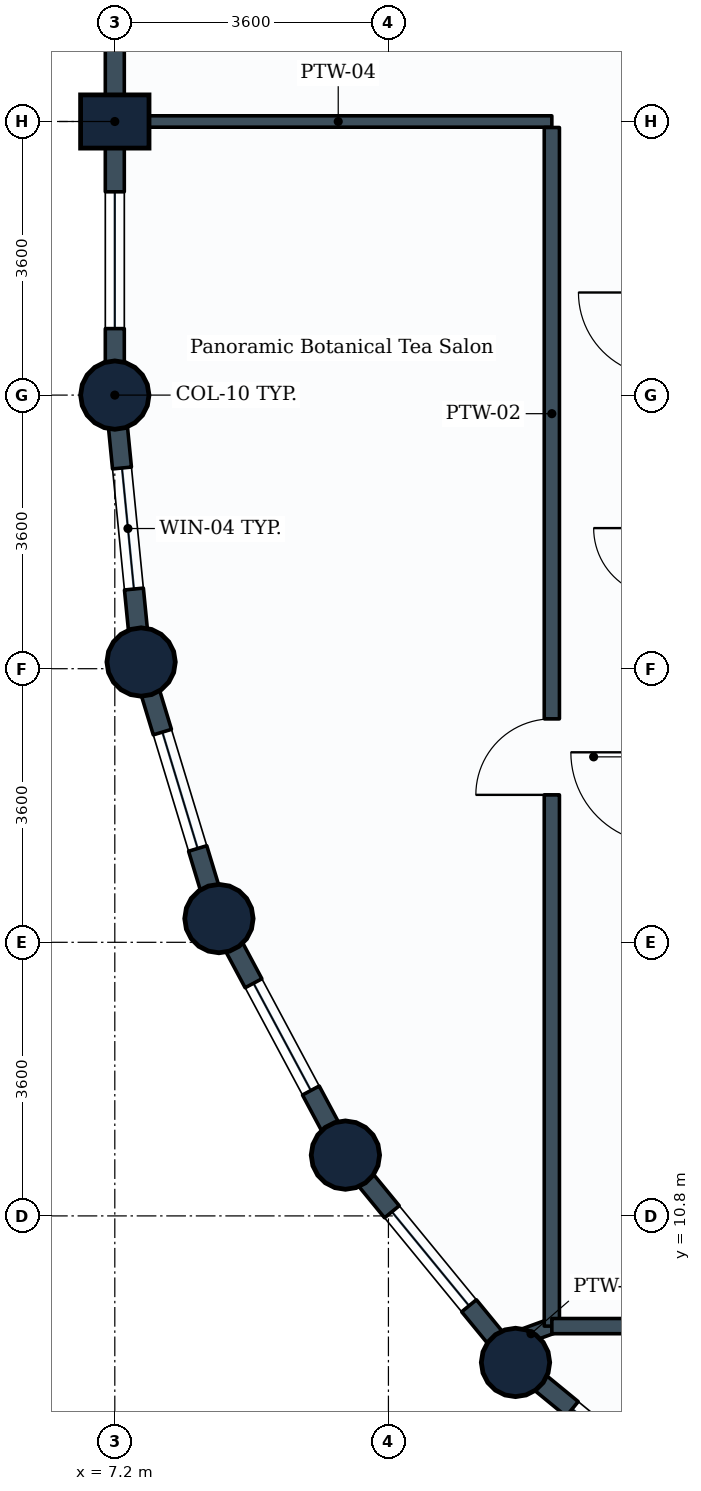
"""IFC4 building model, lengths in metres.
Left out: names, types, materials, properties, quantities, classifications, styles, units other than length and angle.
Written with IfcOpenShell. Run it as: python <this file> out.ifc"""

import sys

from ifc_helpers import new_model, si_unit, direction, frame, frame_2d, origin, origin_2d, place, context, subcontext, project, spatial, rectangle, circle, extrude, element, fill, save


model = new_model("IFC4")
c1 = context("Model", 3, precision=1e-05, world=origin(), true_north=direction((0.0, 1.0)))
c2 = subcontext(c1, "Body", "Model", "MODEL_VIEW")
j1 = project(units=[si_unit("LENGTHUNIT", "METRE"), si_unit("PLANEANGLEUNIT", "RADIAN")], contexts=[c1])
p1 = place(None, origin())
s1 = spatial("IfcSite", under=j1, at=p1, CompositionType="ELEMENT")
p2 = place(p1, origin())
s2 = spatial("IfcBuilding", under=s1, at=p2, CompositionType="ELEMENT")
p3 = place(p2, frame((0.0, 0.0, 174.8)))
s3 = spatial("IfcBuildingStorey", under=s2, at=p3, CompositionType="ELEMENT", Elevation=174.8)
p4 = place(p3, frame((7.2, 21.6, 0.0), z_axis=(0.0, 0.0, 1.0), x_axis=(1.0, 0.0, 0.0)))
e1 = element("IfcColumn", 1, at=p4, inside=s3, PredefinedType="COLUMN", context=c2, shape_type="SweptSolid", body=[
    extrude(circle(Radius=0.45, at=origin_2d()), origin(), (0.0, 0.0, 1.0), 3.8),
])
p5 = place(p3, frame((7.2, 25.2, 0.0), z_axis=(0.0, 0.0, 1.0), x_axis=(0.0, 1.0, 0.0)))
e2 = element("IfcColumn", 2, at=p5, inside=s3, PredefinedType="COLUMN", context=c2, shape_type="SweptSolid", body=[
    extrude(rectangle(XDim=0.7, YDim=0.9, at=origin_2d()), origin(), (0.0, 0.0, 1.0), 3.8),
])
for number, where, z_axis, x_axis in (
    (3, (7.546, 18.088, 0.0), (0.0, 0.0, 1.0), (1.0, 0.0, 0.0)),
    (4, (8.57, 14.712, 0.0), (0.0, 0.0, 1.0), (1.0, 0.0, 0.0)),
    (5, (10.234, 11.6, 0.0), (0.0, 0.0, 1.0), (1.0, 0.0, 0.0)),
    (6, (12.472, 8.872, 0.0), (0.0, 0.0, 1.0), (1.0, 0.0, 0.0)),
):
    element("IfcColumn", number, at=place(p3, frame(where, z_axis=z_axis, x_axis=x_axis)), inside=s3, PredefinedType="COLUMN", context=c2, shape_type="SweptSolid", body=[
        extrude(circle(Radius=0.45, at=origin_2d()), origin(), (0.0, 0.0, 1.0), 3.8),
    ])
p6 = place(p3, frame((7.2, 25.2, 0.0), z_axis=(0.0, 0.0, 1.0), x_axis=(0.0, 1.0, 0.0)))
e7 = element("IfcWall", 7, at=p6, inside=s3, PredefinedType="STANDARD", context=c2, shape_type="SweptSolid", body=[
    extrude(rectangle(XDim=3.6, YDim=0.25, at=frame_2d((1.8, 0.0))), origin(), (0.0, 0.0, 1.0), 2.93),
])
p7 = place(p3, frame((7.2, 21.6, 0.0), z_axis=(0.0, 0.0, 1.0), x_axis=(0.0, 1.0, 0.0)))
e8 = element("IfcWall", 8, at=p7, inside=s3, PredefinedType="STANDARD", context=c2, shape_type="SweptSolid", body=[
    extrude(rectangle(XDim=3.6, YDim=0.25, at=frame_2d((1.8, 0.0))), origin(), (0.0, 0.0, 1.0), 2.93),
])
p8 = place(p7, frame((0.875, 0.0, 0.85)))
e9 = element("IfcOpeningElement", 9, at=p8, cuts=e8, PredefinedType="OPENING", context=c2, shape_type="SweptSolid", body=[
    extrude(rectangle(XDim=1.8, YDim=1.35, at=frame_2d((0.9, 0.675))), frame((0.0, 0.135, 0.0), z_axis=(0.0, -1.0, 0.0), x_axis=(1.0, 0.0, 0.0)), (0.0, 0.0, 1.0), 0.27),
])
p9 = place(p3, frame((7.546, 18.088, 0.0), z_axis=(0.0, 0.0, 1.0), x_axis=(-0.09802417461, 0.995184033831, 0.0)))
e10 = element("IfcWall", 10, at=p9, inside=s3, PredefinedType="STANDARD", context=c2, shape_type="SweptSolid", body=[
    extrude(rectangle(XDim=3.529, YDim=0.25, at=frame_2d((1.765, 0.0))), origin(), (0.0, 0.0, 1.0), 2.93),
])
p10 = place(p9, frame((0.965, 0.0, 0.85)))
e11 = element("IfcOpeningElement", 11, at=p10, cuts=e10, PredefinedType="OPENING", context=c2, shape_type="SweptSolid", body=[
    extrude(rectangle(XDim=1.6, YDim=1.35, at=frame_2d((0.8, 0.675))), frame((0.0, 0.135, 0.0), z_axis=(0.0, -1.0, 0.0), x_axis=(1.0, 0.0, 0.0)), (0.0, 0.0, 1.0), 0.27),
])
p11 = place(p3, frame((8.57, 14.712, 0.0), z_axis=(0.0, 0.0, 1.0), x_axis=(-0.290305086481, 0.956934144423, 0.0)))
e12 = element("IfcWall", 12, at=p11, inside=s3, PredefinedType="STANDARD", context=c2, shape_type="SweptSolid", body=[
    extrude(rectangle(XDim=3.528, YDim=0.25, at=frame_2d((1.764, 0.0))), origin(), (0.0, 0.0, 1.0), 2.93),
])
p12 = place(p11, frame((0.964, 0.0, 0.85)))
e13 = element("IfcOpeningElement", 13, at=p12, cuts=e12, PredefinedType="OPENING", context=c2, shape_type="SweptSolid", body=[
    extrude(rectangle(XDim=1.6, YDim=1.35, at=frame_2d((0.8, 0.675))), frame((0.0, 0.135, 0.0), z_axis=(0.0, -1.0, 0.0), x_axis=(1.0, 0.0, 0.0)), (0.0, 0.0, 1.0), 0.27),
])
p13 = place(p3, frame((10.234, 11.6, 0.0), z_axis=(0.0, 0.0, 1.0), x_axis=(-0.47151087309, 0.881860247748, 0.0)))
e14 = element("IfcWall", 14, at=p13, inside=s3, PredefinedType="STANDARD", context=c2, shape_type="SweptSolid", body=[
    extrude(rectangle(XDim=3.529, YDim=0.25, at=frame_2d((1.764, 0.0))), origin(), (0.0, 0.0, 1.0), 2.93),
])
p14 = place(p13, frame((0.964, 0.0, 0.85)))
e15 = element("IfcOpeningElement", 15, at=p14, cuts=e14, PredefinedType="OPENING", context=c2, shape_type="SweptSolid", body=[
    extrude(rectangle(XDim=1.6, YDim=1.35, at=frame_2d((0.8, 0.675))), frame((0.0, 0.135, 0.0), z_axis=(0.0, -1.0, 0.0), x_axis=(1.0, 0.0, 0.0)), (0.0, 0.0, 1.0), 0.27),
])
p15 = place(p3, frame((12.472, 8.872, 0.0), z_axis=(0.0, 0.0, 1.0), x_axis=(-0.634258295121, 0.773121216285, 0.0)))
e16 = element("IfcWall", 16, at=p15, inside=s3, PredefinedType="STANDARD", context=c2, shape_type="SweptSolid", body=[
    extrude(rectangle(XDim=3.529, YDim=0.25, at=frame_2d((1.764, 0.0))), origin(), (0.0, 0.0, 1.0), 2.93),
])
p16 = place(p15, frame((0.964, 0.0, 0.85)))
e17 = element("IfcOpeningElement", 17, at=p16, cuts=e16, PredefinedType="OPENING", context=c2, shape_type="SweptSolid", body=[
    extrude(rectangle(XDim=1.6, YDim=1.35, at=frame_2d((0.8, 0.675))), frame((0.0, 0.135, 0.0), z_axis=(0.0, -1.0, 0.0), x_axis=(1.0, 0.0, 0.0)), (0.0, 0.0, 1.0), 0.27),
])
p17 = place(p3, frame((15.2, 6.634, 0.0), z_axis=(0.0, 0.0, 1.0), x_axis=(-0.773121216285, 0.634258295121, 0.0)))
e18 = element("IfcWall", 18, at=p17, inside=s3, PredefinedType="STANDARD", context=c2, shape_type="SweptSolid", body=[
    extrude(rectangle(XDim=3.529, YDim=0.25, at=frame_2d((1.764, 0.0))), origin(), (0.0, 0.0, 1.0), 2.93),
])
p18 = place(p17, frame((0.964, 0.0, 0.85)))
e19 = element("IfcOpeningElement", 19, at=p18, cuts=e18, PredefinedType="OPENING", context=c2, shape_type="SweptSolid", body=[
    extrude(rectangle(XDim=1.6, YDim=1.35, at=frame_2d((0.8, 0.675))), frame((0.0, 0.135, 0.0), z_axis=(0.0, -1.0, 0.0), x_axis=(1.0, 0.0, 0.0)), (0.0, 0.0, 1.0), 0.27),
])
p19 = place(p3, frame((7.329, 25.2, 0.0), z_axis=(0.0, 0.0, 1.0), x_axis=(1.0, 0.0, 0.0)))
e20 = element("IfcWall", 20, at=p19, inside=s3, PredefinedType="PARTITIONING", context=c2, shape_type="SweptSolid", body=[
    extrude(rectangle(XDim=5.621, YDim=0.15, at=frame_2d((2.811, 0.0))), origin(), (0.0, 0.0, 1.0), 3.535),
])
p20 = place(p3, frame((12.95, 9.35, 0.0), z_axis=(0.0, 0.0, 1.0), x_axis=(-0.939585793139, -0.342313507376, 0.0)))
e21 = element("IfcWall", 21, at=p20, inside=s3, PredefinedType="PARTITIONING", context=c2, shape_type="SweptSolid", body=[
    extrude(rectangle(XDim=0.584, YDim=0.2, at=frame_2d((0.292, 0.0))), origin(), (0.0, 0.0, 1.0), 2.93),
])
p21 = place(p3, frame((12.95, 9.35, 0.0), z_axis=(0.0, 0.0, 1.0), x_axis=(0.0, 1.0, 0.0)))
e22 = element("IfcWall", 22, at=p21, inside=s3, PredefinedType="PARTITIONING", context=c2, shape_type="SweptSolid", body=[
    extrude(rectangle(XDim=15.771, YDim=0.2, at=frame_2d((7.885, 0.0))), origin(), (0.0, 0.0, 1.0), 3.17),
])
p22 = place(p21, frame((6.99, 0.0, 0.0)))
e23 = element("IfcOpeningElement", 23, at=p22, cuts=e22, PredefinedType="OPENING", context=c2, shape_type="SweptSolid", body=[
    extrude(rectangle(XDim=1.0, YDim=2.1, at=frame_2d((0.5, 1.05))), frame((0.0, 0.11, 0.0), z_axis=(0.0, -1.0, 0.0), x_axis=(1.0, 0.0, 0.0)), (0.0, 0.0, 1.0), 0.22),
])
p23 = place(p3, frame((12.95, 9.35, 0.0), z_axis=(0.0, 0.0, 1.0), x_axis=(1.0, 0.0, 0.0)))
e24 = element("IfcWall", 24, at=p23, inside=s3, PredefinedType="PARTITIONING", context=c2, shape_type="SweptSolid", body=[
    extrude(rectangle(XDim=15.771, YDim=0.2, at=frame_2d((7.885, 0.0))), origin(), (0.0, 0.0, 1.0), 3.17),
])
p24 = place(p23, frame((4.836, 0.0, 0.0)))
e25 = element("IfcOpeningElement", 25, at=p24, cuts=e24, PredefinedType="OPENING", context=c2, shape_type="SweptSolid", body=[
    extrude(rectangle(XDim=1.0, YDim=2.1, at=frame_2d((0.5, 1.05))), frame((0.0, 0.11, 0.0), z_axis=(0.0, -1.0, 0.0), x_axis=(1.0, 0.0, 0.0)), (0.0, 0.0, 1.0), 0.22),
])
p25 = place(p8, origin())
e26 = element("IfcWindow", 26, at=p25, inside=s3, PartitioningType="SINGLE_PANEL", PredefinedType="WINDOW", context=c2, shape_type="SweptSolid", body=[
    extrude(rectangle(XDim=1.8, YDim=1.35, at=frame_2d((0.9, 0.675))), frame((0.0, 0.03, 0.0), z_axis=(0.0, -1.0, 0.0), x_axis=(1.0, 0.0, 0.0)), (0.0, 0.0, 1.0), 0.06),
])
fill(e9, e26)
p26 = place(p10, origin())
e27 = element("IfcWindow", 27, at=p26, inside=s3, PartitioningType="SINGLE_PANEL", PredefinedType="WINDOW", context=c2, shape_type="SweptSolid", body=[
    extrude(rectangle(XDim=1.6, YDim=1.35, at=frame_2d((0.8, 0.675))), frame((0.0, 0.03, 0.0), z_axis=(0.0, -1.0, 0.0), x_axis=(1.0, 0.0, 0.0)), (0.0, 0.0, 1.0), 0.06),
])
fill(e11, e27)
p27 = place(p12, origin())
e28 = element("IfcWindow", 28, at=p27, inside=s3, PartitioningType="SINGLE_PANEL", PredefinedType="WINDOW", context=c2, shape_type="SweptSolid", body=[
    extrude(rectangle(XDim=1.6, YDim=1.35, at=frame_2d((0.8, 0.675))), frame((0.0, 0.03, 0.0), z_axis=(0.0, -1.0, 0.0), x_axis=(1.0, 0.0, 0.0)), (0.0, 0.0, 1.0), 0.06),
])
fill(e13, e28)
p28 = place(p14, origin())
e29 = element("IfcWindow", 29, at=p28, inside=s3, PartitioningType="SINGLE_PANEL", PredefinedType="WINDOW", context=c2, shape_type="SweptSolid", body=[
    extrude(rectangle(XDim=1.6, YDim=1.35, at=frame_2d((0.8, 0.675))), frame((0.0, 0.03, 0.0), z_axis=(0.0, -1.0, 0.0), x_axis=(1.0, 0.0, 0.0)), (0.0, 0.0, 1.0), 0.06),
])
fill(e15, e29)
p29 = place(p16, origin())
e30 = element("IfcWindow", 30, at=p29, inside=s3, PartitioningType="SINGLE_PANEL", PredefinedType="WINDOW", context=c2, shape_type="SweptSolid", body=[
    extrude(rectangle(XDim=1.6, YDim=1.35, at=frame_2d((0.8, 0.675))), frame((0.0, 0.03, 0.0), z_axis=(0.0, -1.0, 0.0), x_axis=(1.0, 0.0, 0.0)), (0.0, 0.0, 1.0), 0.06),
])
fill(e17, e30)
p30 = place(p18, origin())
e31 = element("IfcWindow", 31, at=p30, inside=s3, PartitioningType="SINGLE_PANEL", PredefinedType="WINDOW", context=c2, shape_type="SweptSolid", body=[
    extrude(rectangle(XDim=1.6, YDim=1.35, at=frame_2d((0.8, 0.675))), frame((0.0, 0.03, 0.0), z_axis=(0.0, -1.0, 0.0), x_axis=(1.0, 0.0, 0.0)), (0.0, 0.0, 1.0), 0.06),
])
fill(e19, e31)
p31 = place(p22, origin())
e32 = element("IfcDoor", 32, at=p31, inside=s3, OperationType="SINGLE_SWING_LEFT", PredefinedType="DOOR", context=c2, shape_type="SweptSolid", body=[
    extrude(rectangle(XDim=1.0, YDim=2.1, at=frame_2d((0.5, 1.05))), frame((0.0, 0.025, 0.0), z_axis=(0.0, -1.0, 0.0), x_axis=(1.0, 0.0, 0.0)), (0.0, 0.0, 1.0), 0.05),
])
fill(e23, e32)
save(model, sys.argv[1])
